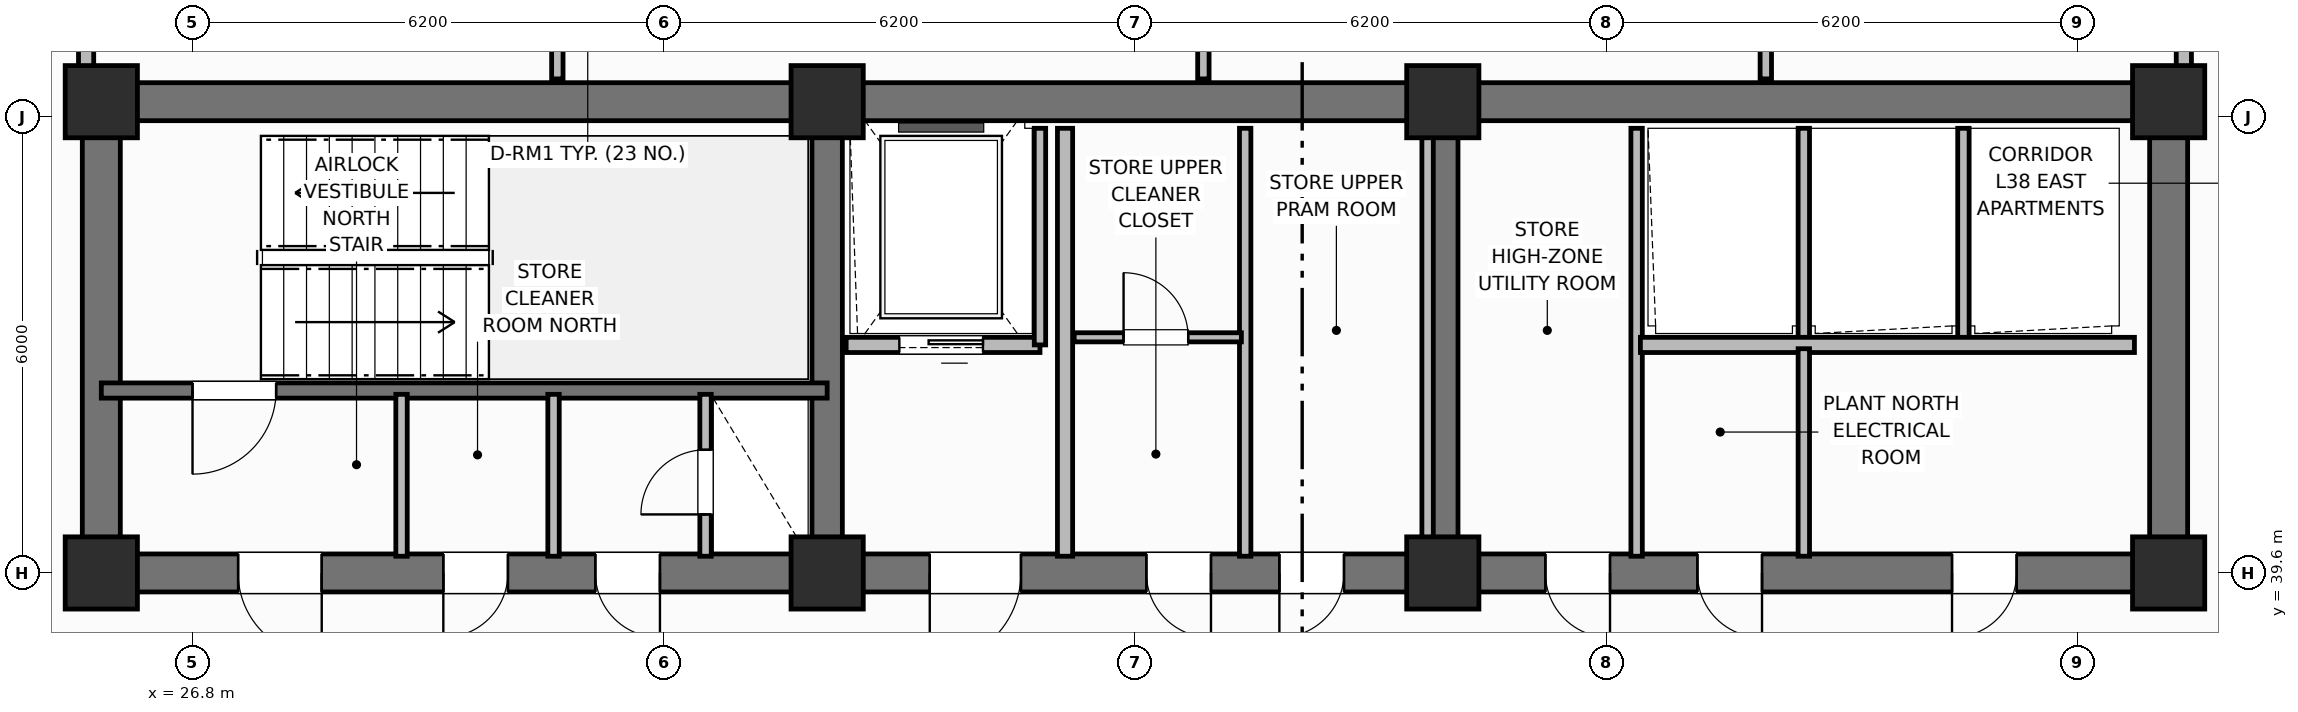
"""IFC4 building model, lengths in metres.
Left out: names, types, materials, properties, quantities, classifications, styles, units other than length and angle.
Written with IfcOpenShell. Run it as: python <this file> out.ifc"""

import sys

from ifc_helpers import new_model, si_unit, direction, frame, frame_2d, origin, origin_2d, place, context, subcontext, project, spatial, rectangle, extrude, element, fill, save


model = new_model("IFC4")
c1 = context("Model", 3, precision=1e-05, world=origin(), true_north=direction((0.0, 1.0)))
c2 = subcontext(c1, "Body", "Model", "MODEL_VIEW")
j1 = project(units=[si_unit("LENGTHUNIT", "METRE"), si_unit("PLANEANGLEUNIT", "RADIAN")], contexts=[c1])
p1 = place(None, origin())
s1 = spatial("IfcSite", under=j1, at=p1, CompositionType="ELEMENT")
p2 = place(p1, origin())
s2 = spatial("IfcBuilding", under=s1, at=p2, CompositionType="ELEMENT")
p3 = place(p2, frame((0.0, 0.0, 155.2)))
s3 = spatial("IfcBuildingStorey", under=s2, at=p3, CompositionType="ELEMENT", Elevation=155.2)
p4 = place(p3, frame((25.6, 45.8, 0.0), z_axis=(0.0, 0.0, 1.0), x_axis=(1.0, 0.0, 0.0)))
e1 = element("IfcWall", 1, at=p4, inside=s3, PredefinedType="SHEAR", context=c2, shape_type="SweptSolid", body=[
    extrude(rectangle(XDim=27.2, YDim=0.5, at=frame_2d((13.6, 0.0))), origin(), (0.0, 0.0, 1.0), 3.7),
])
for number, where, z_axis, x_axis in (
    (2, (25.6, 39.85, 0.0), (0.0, 0.0, 1.0), (0.0, 1.0, 0.0)),
    (3, (52.8, 39.85, 0.0), (0.0, 0.0, 1.0), (0.0, 1.0, 0.0)),
):
    element("IfcWall", number, at=place(p3, frame(where, z_axis=z_axis, x_axis=x_axis)), inside=s3, PredefinedType="SHEAR", context=c2, shape_type="SweptSolid", body=[
        extrude(rectangle(XDim=5.7, YDim=0.5, at=frame_2d((2.85, 0.0))), origin(), (0.0, 0.0, 1.0), 3.7),
    ])
p5 = place(p3, frame((52.8, 39.6, 0.0), z_axis=(0.0, 0.0, 1.0), x_axis=(-1.0, 0.0, 0.0)))
e4 = element("IfcWall", 4, at=p5, inside=s3, PredefinedType="SHEAR", context=c2, shape_type="SweptSolid", body=[
    extrude(rectangle(XDim=27.2, YDim=0.5, at=frame_2d((13.6, 0.0))), origin(), (0.0, 0.0, 1.0), 3.7),
])
p6 = place(p5, frame((24.3, 0.0, 0.0)))
e5 = element("IfcOpeningElement", 5, at=p6, cuts=e4, PredefinedType="OPENING", context=c2, shape_type="SweptSolid", body=[
    extrude(rectangle(XDim=1.1, YDim=2.15, at=frame_2d((0.55, 1.075))), frame((0.0, 0.26, 0.0), z_axis=(0.0, -1.0, 0.0), x_axis=(1.0, 0.0, 0.0)), (0.0, 0.0, 1.0), 0.52),
])
p7 = place(p5, frame((21.85, 0.0, 0.0)))
e6 = element("IfcOpeningElement", 6, at=p7, cuts=e4, PredefinedType="OPENING", context=c2, shape_type="SweptSolid", body=[
    extrude(rectangle(XDim=0.85, YDim=2.1, at=frame_2d((0.425, 1.05))), frame((0.0, 0.26, 0.0), z_axis=(0.0, -1.0, 0.0), x_axis=(1.0, 0.0, 0.0)), (0.0, 0.0, 1.0), 0.52),
])
p8 = place(p5, frame((19.85, 0.0, 0.0)))
e7 = element("IfcOpeningElement", 7, at=p8, cuts=e4, PredefinedType="OPENING", context=c2, shape_type="SweptSolid", body=[
    extrude(rectangle(XDim=0.85, YDim=2.1, at=frame_2d((0.425, 1.05))), frame((0.0, 0.26, 0.0), z_axis=(0.0, -1.0, 0.0), x_axis=(1.0, 0.0, 0.0)), (0.0, 0.0, 1.0), 0.52),
])
p9 = place(p5, frame((15.1, 0.0, 0.0)))
e8 = element("IfcOpeningElement", 8, at=p9, cuts=e4, PredefinedType="OPENING", context=c2, shape_type="SweptSolid", body=[
    extrude(rectangle(XDim=1.2, YDim=2.15, at=frame_2d((0.6, 1.075))), frame((0.0, 0.26, 0.0), z_axis=(0.0, -1.0, 0.0), x_axis=(1.0, 0.0, 0.0)), (0.0, 0.0, 1.0), 0.52),
])
p10 = place(p5, frame((12.6, 0.0, 0.0)))
e9 = element("IfcOpeningElement", 9, at=p10, cuts=e4, PredefinedType="OPENING", context=c2, shape_type="SweptSolid", body=[
    extrude(rectangle(XDim=0.85, YDim=2.1, at=frame_2d((0.425, 1.05))), frame((0.0, 0.26, 0.0), z_axis=(0.0, -1.0, 0.0), x_axis=(1.0, 0.0, 0.0)), (0.0, 0.0, 1.0), 0.52),
])
p11 = place(p5, frame((10.85, 0.0, 0.0)))
e10 = element("IfcOpeningElement", 10, at=p11, cuts=e4, PredefinedType="OPENING", context=c2, shape_type="SweptSolid", body=[
    extrude(rectangle(XDim=0.85, YDim=2.1, at=frame_2d((0.425, 1.05))), frame((0.0, 0.26, 0.0), z_axis=(0.0, -1.0, 0.0), x_axis=(1.0, 0.0, 0.0)), (0.0, 0.0, 1.0), 0.52),
])
p12 = place(p5, frame((7.35, 0.0, 0.0)))
e11 = element("IfcOpeningElement", 11, at=p12, cuts=e4, PredefinedType="OPENING", context=c2, shape_type="SweptSolid", body=[
    extrude(rectangle(XDim=0.85, YDim=2.1, at=frame_2d((0.425, 1.05))), frame((0.0, 0.26, 0.0), z_axis=(0.0, -1.0, 0.0), x_axis=(1.0, 0.0, 0.0)), (0.0, 0.0, 1.0), 0.52),
])
p13 = place(p5, frame((5.35, 0.0, 0.0)))
e12 = element("IfcOpeningElement", 12, at=p13, cuts=e4, PredefinedType="OPENING", context=c2, shape_type="SweptSolid", body=[
    extrude(rectangle(XDim=0.85, YDim=2.1, at=frame_2d((0.425, 1.05))), frame((0.0, 0.26, 0.0), z_axis=(0.0, -1.0, 0.0), x_axis=(1.0, 0.0, 0.0)), (0.0, 0.0, 1.0), 0.52),
])
p14 = place(p5, frame((2.0, 0.0, 0.0)))
e13 = element("IfcOpeningElement", 13, at=p14, cuts=e4, PredefinedType="OPENING", context=c2, shape_type="SweptSolid", body=[
    extrude(rectangle(XDim=0.85, YDim=2.1, at=frame_2d((0.425, 1.05))), frame((0.0, 0.26, 0.0), z_axis=(0.0, -1.0, 0.0), x_axis=(1.0, 0.0, 0.0)), (0.0, 0.0, 1.0), 0.52),
])
for number, where, z_axis, x_axis in (
    (14, (35.15, 39.85, 0.0), (0.0, 0.0, 1.0), (0.0, 1.0, 0.0)),
    (15, (43.25, 39.85, 0.0), (0.0, 0.0, 1.0), (0.0, 1.0, 0.0)),
):
    element("IfcWall", number, at=place(p3, frame(where, z_axis=z_axis, x_axis=x_axis)), inside=s3, PredefinedType="SHEAR", context=c2, shape_type="SweptSolid", body=[
        extrude(rectangle(XDim=5.7, YDim=0.4, at=frame_2d((2.85, 0.0))), origin(), (0.0, 0.0, 1.0), 3.7),
    ])
for number, where, z_axis, x_axis in (
    (16, (25.6, 39.6, 0.0), (0.0, 0.0, 1.0), (1.0, 0.0, 0.0)),
    (17, (25.6, 45.8, 0.0), (0.0, 0.0, 1.0), (1.0, 0.0, 0.0)),
    (18, (35.15, 39.6, 0.0), (0.0, 0.0, 1.0), (1.0, 0.0, 0.0)),
    (19, (35.15, 45.8, 0.0), (0.0, 0.0, 1.0), (1.0, 0.0, 0.0)),
    (20, (43.25, 39.6, 0.0), (0.0, 0.0, 1.0), (1.0, 0.0, 0.0)),
    (21, (43.25, 45.8, 0.0), (0.0, 0.0, 1.0), (1.0, 0.0, 0.0)),
    (22, (52.8, 39.6, 0.0), (0.0, 0.0, 1.0), (1.0, 0.0, 0.0)),
    (23, (52.8, 45.8, 0.0), (0.0, 0.0, 1.0), (1.0, 0.0, 0.0)),
):
    element("IfcColumn", number, at=place(p3, frame(where, z_axis=z_axis, x_axis=x_axis)), inside=s3, PredefinedType="COLUMN", context=c2, shape_type="SweptSolid", body=[
        extrude(rectangle(XDim=0.95, YDim=0.95, at=origin_2d()), origin(), (0.0, 0.0, 1.0), 3.7),
    ])
p15 = place(p3, frame((35.15, 42.0, 0.0), z_axis=(0.0, 0.0, 1.0), x_axis=(-1.0, 0.0, 0.0)))
e24 = element("IfcWall", 24, at=p15, inside=s3, PredefinedType="SHEAR", context=c2, shape_type="SweptSolid", body=[
    extrude(rectangle(XDim=9.55, YDim=0.2, at=frame_2d((4.775, 0.0))), origin(), (0.0, 0.0, 1.0), 3.7),
])
p16 = place(p15, frame((7.25, 0.0, 0.0)))
e25 = element("IfcOpeningElement", 25, at=p16, cuts=e24, PredefinedType="OPENING", context=c2, shape_type="SweptSolid", body=[
    extrude(rectangle(XDim=1.1, YDim=2.15, at=frame_2d((0.55, 1.075))), frame((0.0, 0.11, 0.0), z_axis=(0.0, -1.0, 0.0), x_axis=(1.0, 0.0, 0.0)), (0.0, 0.0, 1.0), 0.22),
])
p17 = place(p3, frame((33.55, 39.82, 0.0), z_axis=(0.0, 0.0, 1.0), x_axis=(0.0, 1.0, 0.0)))
e26 = element("IfcWall", 26, at=p17, inside=s3, PredefinedType="PARTITIONING", context=c2, shape_type="SweptSolid", body=[
    extrude(rectangle(XDim=2.13, YDim=0.15, at=frame_2d((1.065, 0.0))), origin(), (0.0, 0.0, 1.0), 2.55),
])
p18 = place(p17, frame((0.55, 0.0, 0.0)))
e27 = element("IfcOpeningElement", 27, at=p18, cuts=e26, PredefinedType="OPENING", context=c2, shape_type="SweptSolid", body=[
    extrude(rectangle(XDim=0.85, YDim=2.05, at=frame_2d((0.425, 1.025))), frame((0.0, 0.085, 0.0), z_axis=(0.0, -1.0, 0.0), x_axis=(1.0, 0.0, 0.0)), (0.0, 0.0, 1.0), 0.17),
])
for number, where, z_axis, x_axis in (
    (28, (29.55, 39.82, 0.0), (0.0, 0.0, 1.0), (0.0, 1.0, 0.0)),
    (29, (31.55, 39.82, 0.0), (0.0, 0.0, 1.0), (0.0, 1.0, 0.0)),
):
    element("IfcWall", number, at=place(p3, frame(where, z_axis=z_axis, x_axis=x_axis)), inside=s3, PredefinedType="PARTITIONING", context=c2, shape_type="SweptSolid", body=[
        extrude(rectangle(XDim=2.13, YDim=0.15, at=frame_2d((1.065, 0.0))), origin(), (0.0, 0.0, 1.0), 2.55),
    ])
p19 = place(p3, frame((37.95, 42.6, 0.0), z_axis=(0.0, 0.0, 1.0), x_axis=(-1.0, 0.0, 0.0)))
e30 = element("IfcWall", 30, at=p19, inside=s3, PredefinedType="PARTITIONING", context=c2, shape_type="SweptSolid", body=[
    extrude(rectangle(XDim=2.55, YDim=0.2, at=frame_2d((1.275, 0.0))), origin(), (0.0, 0.0, 1.0), 2.32),
])
p20 = place(p19, frame((0.75, 0.0, 0.0)))
e31 = element("IfcOpeningElement", 31, at=p20, cuts=e30, PredefinedType="OPENING", context=c2, shape_type="SweptSolid", body=[
    extrude(rectangle(XDim=1.1, YDim=2.15, at=frame_2d((0.55, 1.075))), frame((0.0, 0.11, 0.0), z_axis=(0.0, -1.0, 0.0), x_axis=(1.0, 0.0, 0.0)), (0.0, 0.0, 1.0), 0.22),
])
p21 = place(p3, frame((37.95, 42.6, 0.0), z_axis=(0.0, 0.0, 1.0), x_axis=(0.0, 1.0, 0.0)))
e32 = element("IfcWall", 32, at=p21, inside=s3, PredefinedType="PARTITIONING", context=c2, shape_type="SweptSolid", body=[
    extrude(rectangle(XDim=2.85, YDim=0.15, at=frame_2d((1.425, 0.0))), origin(), (0.0, 0.0, 1.0), 2.55),
])
p22 = place(p3, frame((38.28, 39.82, 0.0), z_axis=(0.0, 0.0, 1.0), x_axis=(0.0, 1.0, 0.0)))
e33 = element("IfcWall", 33, at=p22, inside=s3, PredefinedType="PARTITIONING", context=c2, shape_type="SweptSolid", body=[
    extrude(rectangle(XDim=5.63, YDim=0.2, at=frame_2d((2.815, 0.0))), origin(), (0.0, 0.0, 1.0), 2.55),
])
for number, where, z_axis, x_axis in (
    (34, (43.05, 39.82, 0.0), (0.0, 0.0, 1.0), (0.0, 1.0, 0.0)),
    (35, (40.65, 39.82, 0.0), (0.0, 0.0, 1.0), (0.0, 1.0, 0.0)),
):
    element("IfcWall", number, at=place(p3, frame(where, z_axis=z_axis, x_axis=x_axis)), inside=s3, PredefinedType="PARTITIONING", context=c2, shape_type="SweptSolid", body=[
        extrude(rectangle(XDim=5.63, YDim=0.15, at=frame_2d((2.815, 0.0))), origin(), (0.0, 0.0, 1.0), 2.55),
    ])
p23 = place(p3, frame((38.4, 42.7, 0.0), z_axis=(0.0, 0.0, 1.0), x_axis=(1.0, 0.0, 0.0)))
e36 = element("IfcWall", 36, at=p23, inside=s3, PredefinedType="PARTITIONING", context=c2, shape_type="SweptSolid", body=[
    extrude(rectangle(XDim=2.2, YDim=0.12, at=frame_2d((1.1, 0.0))), origin(), (0.0, 0.0, 1.0), 2.32),
])
p24 = place(p23, frame((0.65, 0.0, 0.0)))
e37 = element("IfcOpeningElement", 37, at=p24, cuts=e36, PredefinedType="OPENING", context=c2, shape_type="SweptSolid", body=[
    extrude(rectangle(XDim=0.85, YDim=2.1, at=frame_2d((0.425, 1.05))), frame((0.0, 0.07, 0.0), z_axis=(0.0, -1.0, 0.0), x_axis=(1.0, 0.0, 0.0)), (0.0, 0.0, 1.0), 0.14),
])
p25 = place(p3, frame((45.8, 39.82, 0.0), z_axis=(0.0, 0.0, 1.0), x_axis=(0.0, 1.0, 0.0)))
e38 = element("IfcWall", 38, at=p25, inside=s3, PredefinedType="PARTITIONING", context=c2, shape_type="SweptSolid", body=[
    extrude(rectangle(XDim=5.63, YDim=0.15, at=frame_2d((2.815, 0.0))), origin(), (0.0, 0.0, 1.0), 2.55),
])
for number, where, z_axis, x_axis in (
    (39, (48.0, 42.65, 0.0), (0.0, 0.0, 1.0), (0.0, 1.0, 0.0)),
    (40, (50.1, 42.65, 0.0), (0.0, 0.0, 1.0), (0.0, 1.0, 0.0)),
):
    element("IfcWall", number, at=place(p3, frame(where, z_axis=z_axis, x_axis=x_axis)), inside=s3, PredefinedType="PARTITIONING", context=c2, shape_type="SweptSolid", body=[
        extrude(rectangle(XDim=2.8, YDim=0.15, at=frame_2d((1.4, 0.0))), origin(), (0.0, 0.0, 1.0), 2.55),
    ])
p26 = place(p3, frame((52.35, 42.6, 0.0), z_axis=(0.0, 0.0, 1.0), x_axis=(-1.0, 0.0, 0.0)))
e41 = element("IfcWall", 41, at=p26, inside=s3, PredefinedType="PARTITIONING", context=c2, shape_type="SweptSolid", body=[
    extrude(rectangle(XDim=6.5, YDim=0.2, at=frame_2d((3.25, 0.0))), origin(), (0.0, 0.0, 1.0), 2.55),
])
p27 = place(p3, frame((48.0, 39.82, 0.0), z_axis=(0.0, 0.0, 1.0), x_axis=(0.0, 1.0, 0.0)))
e42 = element("IfcWall", 42, at=p27, inside=s3, PredefinedType="PARTITIONING", context=c2, shape_type="SweptSolid", body=[
    extrude(rectangle(XDim=2.73, YDim=0.15, at=frame_2d((1.365, 0.0))), origin(), (0.0, 0.0, 1.0), 2.55),
])
p28 = place(p3, frame((31.6, 46.1, 0.0), z_axis=(0.0, 0.0, 1.0), x_axis=(0.0, 1.0, 0.0)))
e43 = element("IfcWall", 43, at=p28, inside=s3, PredefinedType="PARTITIONING", context=c2, shape_type="SweptSolid", body=[
    extrude(rectangle(XDim=3.43, YDim=0.15, at=frame_2d((1.715, 0.0))), origin(), (0.0, 0.0, 1.0), 2.55),
])
p29 = place(p28, frame((0.85, 0.0, 0.0)))
e44 = element("IfcOpeningElement", 44, at=p29, cuts=e43, PredefinedType="OPENING", context=c2, shape_type="SweptSolid", body=[
    extrude(rectangle(XDim=0.9, YDim=2.1, at=frame_2d((0.45, 1.05))), frame((0.0, 0.085, 0.0), z_axis=(0.0, -1.0, 0.0), x_axis=(1.0, 0.0, 0.0)), (0.0, 0.0, 1.0), 0.17),
])
p30 = place(p3, frame((40.1, 46.1, 0.0), z_axis=(0.0, 0.0, 1.0), x_axis=(0.0, 1.0, 0.0)))
e45 = element("IfcWall", 45, at=p30, inside=s3, PredefinedType="PARTITIONING", context=c2, shape_type="SweptSolid", body=[
    extrude(rectangle(XDim=3.43, YDim=0.15, at=frame_2d((1.715, 0.0))), origin(), (0.0, 0.0, 1.0), 2.55),
])
p31 = place(p3, frame((47.5, 46.1, 0.0), z_axis=(0.0, 0.0, 1.0), x_axis=(0.0, 1.0, 0.0)))
e46 = element("IfcWall", 46, at=p31, inside=s3, PredefinedType="PARTITIONING", context=c2, shape_type="SweptSolid", body=[
    extrude(rectangle(XDim=3.43, YDim=0.15, at=frame_2d((1.715, 0.0))), origin(), (0.0, 0.0, 1.0), 2.55),
])
p32 = place(p31, frame((0.85, 0.0, 0.0)))
e47 = element("IfcOpeningElement", 47, at=p32, cuts=e46, PredefinedType="OPENING", context=c2, shape_type="SweptSolid", body=[
    extrude(rectangle(XDim=0.9, YDim=2.1, at=frame_2d((0.45, 1.05))), frame((0.0, 0.085, 0.0), z_axis=(0.0, -1.0, 0.0), x_axis=(1.0, 0.0, 0.0)), (0.0, 0.0, 1.0), 0.17),
])
p33 = place(p3, frame((25.4, 46.1, 0.0), z_axis=(0.0, 0.0, 1.0), x_axis=(0.0, 1.0, 0.0)))
e48 = element("IfcWall", 48, at=p33, inside=s3, PredefinedType="PARTITIONING", context=c2, shape_type="SweptSolid", body=[
    extrude(rectangle(XDim=2.48, YDim=0.2, at=frame_2d((1.24, 0.0))), origin(), (0.0, 0.0, 1.0), 2.55),
])
p34 = place(p33, frame((0.65, 0.0, 0.0)))
e49 = element("IfcOpeningElement", 49, at=p34, cuts=e48, PredefinedType="OPENING", context=c2, shape_type="SweptSolid", body=[
    extrude(rectangle(XDim=0.9, YDim=2.1, at=frame_2d((0.45, 1.05))), frame((0.0, 0.11, 0.0), z_axis=(0.0, -1.0, 0.0), x_axis=(1.0, 0.0, 0.0)), (0.0, 0.0, 1.0), 0.22),
])
p35 = place(p3, frame((53.0, 46.1, 0.0), z_axis=(0.0, 0.0, 1.0), x_axis=(0.0, 1.0, 0.0)))
e50 = element("IfcWall", 50, at=p35, inside=s3, PredefinedType="PARTITIONING", context=c2, shape_type="SweptSolid", body=[
    extrude(rectangle(XDim=2.48, YDim=0.2, at=frame_2d((1.24, 0.0))), origin(), (0.0, 0.0, 1.0), 2.55),
])
p36 = place(p35, frame((0.65, 0.0, 0.0)))
e51 = element("IfcOpeningElement", 51, at=p36, cuts=e50, PredefinedType="OPENING", context=c2, shape_type="SweptSolid", body=[
    extrude(rectangle(XDim=0.9, YDim=2.1, at=frame_2d((0.45, 1.05))), frame((0.0, 0.11, 0.0), z_axis=(0.0, -1.0, 0.0), x_axis=(1.0, 0.0, 0.0)), (0.0, 0.0, 1.0), 0.22),
])
p37 = place(p16, origin())
e52 = element("IfcDoor", 52, at=p37, inside=s3, OperationType="SINGLE_SWING_RIGHT", PredefinedType="DOOR", context=c2, shape_type="SweptSolid", body=[
    extrude(rectangle(XDim=1.1, YDim=2.15, at=frame_2d((0.55, 1.075))), frame((0.0, 0.025, 0.0), z_axis=(0.0, -1.0, 0.0), x_axis=(1.0, 0.0, 0.0)), (0.0, 0.0, 1.0), 0.05),
])
fill(e25, e52)
p38 = place(p18, origin())
e53 = element("IfcDoor", 53, at=p38, inside=s3, OperationType="SINGLE_SWING_LEFT", PredefinedType="TRAPDOOR", context=c2, shape_type="SweptSolid", body=[
    extrude(rectangle(XDim=0.85, YDim=2.05, at=frame_2d((0.425, 1.025))), frame((0.0, 0.025, 0.0), z_axis=(0.0, -1.0, 0.0), x_axis=(1.0, 0.0, 0.0)), (0.0, 0.0, 1.0), 0.05),
])
fill(e27, e53)
p39 = place(p20, origin())
e54 = element("IfcDoor", 54, at=p39, inside=s3, OperationType="SLIDING_TO_LEFT", PredefinedType="DOOR", context=c2, shape_type="SweptSolid", body=[
    extrude(rectangle(XDim=1.1, YDim=2.15, at=frame_2d((0.55, 1.075))), frame((0.0, 0.025, 0.0), z_axis=(0.0, -1.0, 0.0), x_axis=(1.0, 0.0, 0.0)), (0.0, 0.0, 1.0), 0.05),
])
fill(e31, e54)
p40 = place(p24, origin())
e55 = element("IfcDoor", 55, at=p40, inside=s3, OperationType="SINGLE_SWING_LEFT", PredefinedType="DOOR", context=c2, shape_type="SweptSolid", body=[
    extrude(rectangle(XDim=0.85, YDim=2.1, at=frame_2d((0.425, 1.05))), frame((0.0, 0.025, 0.0), z_axis=(0.0, -1.0, 0.0), x_axis=(1.0, 0.0, 0.0)), (0.0, 0.0, 1.0), 0.05),
])
fill(e37, e55)
p41 = place(p6, origin())
e56 = element("IfcDoor", 56, at=p41, inside=s3, OperationType="SINGLE_SWING_LEFT", PredefinedType="DOOR", context=c2, shape_type="SweptSolid", body=[
    extrude(rectangle(XDim=1.1, YDim=2.15, at=frame_2d((0.55, 1.075))), frame((0.0, 0.025, 0.0), z_axis=(0.0, -1.0, 0.0), x_axis=(1.0, 0.0, 0.0)), (0.0, 0.0, 1.0), 0.05),
])
fill(e5, e56)
p42 = place(p7, origin())
e57 = element("IfcDoor", 57, at=p42, inside=s3, OperationType="SINGLE_SWING_RIGHT", PredefinedType="DOOR", context=c2, shape_type="SweptSolid", body=[
    extrude(rectangle(XDim=0.85, YDim=2.1, at=frame_2d((0.425, 1.05))), frame((0.0, 0.025, 0.0), z_axis=(0.0, -1.0, 0.0), x_axis=(1.0, 0.0, 0.0)), (0.0, 0.0, 1.0), 0.05),
])
fill(e6, e57)
p43 = place(p8, origin())
e58 = element("IfcDoor", 58, at=p43, inside=s3, OperationType="SINGLE_SWING_LEFT", PredefinedType="DOOR", context=c2, shape_type="SweptSolid", body=[
    extrude(rectangle(XDim=0.85, YDim=2.1, at=frame_2d((0.425, 1.05))), frame((0.0, 0.025, 0.0), z_axis=(0.0, -1.0, 0.0), x_axis=(1.0, 0.0, 0.0)), (0.0, 0.0, 1.0), 0.05),
])
fill(e7, e58)
p44 = place(p9, origin())
e59 = element("IfcDoor", 59, at=p44, inside=s3, OperationType="SINGLE_SWING_RIGHT", PredefinedType="DOOR", context=c2, shape_type="SweptSolid", body=[
    extrude(rectangle(XDim=1.2, YDim=2.15, at=frame_2d((0.6, 1.075))), frame((0.0, 0.025, 0.0), z_axis=(0.0, -1.0, 0.0), x_axis=(1.0, 0.0, 0.0)), (0.0, 0.0, 1.0), 0.05),
])
fill(e8, e59)
p45 = place(p10, origin())
e60 = element("IfcDoor", 60, at=p45, inside=s3, OperationType="SINGLE_SWING_LEFT", PredefinedType="DOOR", context=c2, shape_type="SweptSolid", body=[
    extrude(rectangle(XDim=0.85, YDim=2.1, at=frame_2d((0.425, 1.05))), frame((0.0, 0.025, 0.0), z_axis=(0.0, -1.0, 0.0), x_axis=(1.0, 0.0, 0.0)), (0.0, 0.0, 1.0), 0.05),
])
fill(e9, e60)
p46 = place(p11, origin())
e61 = element("IfcDoor", 61, at=p46, inside=s3, OperationType="SINGLE_SWING_RIGHT", PredefinedType="DOOR", context=c2, shape_type="SweptSolid", body=[
    extrude(rectangle(XDim=0.85, YDim=2.1, at=frame_2d((0.425, 1.05))), frame((0.0, 0.025, 0.0), z_axis=(0.0, -1.0, 0.0), x_axis=(1.0, 0.0, 0.0)), (0.0, 0.0, 1.0), 0.05),
])
fill(e10, e61)
p47 = place(p12, origin())
e62 = element("IfcDoor", 62, at=p47, inside=s3, OperationType="SINGLE_SWING_LEFT", PredefinedType="DOOR", context=c2, shape_type="SweptSolid", body=[
    extrude(rectangle(XDim=0.85, YDim=2.1, at=frame_2d((0.425, 1.05))), frame((0.0, 0.025, 0.0), z_axis=(0.0, -1.0, 0.0), x_axis=(1.0, 0.0, 0.0)), (0.0, 0.0, 1.0), 0.05),
])
fill(e11, e62)
p48 = place(p13, origin())
e63 = element("IfcDoor", 63, at=p48, inside=s3, OperationType="SINGLE_SWING_LEFT", PredefinedType="DOOR", context=c2, shape_type="SweptSolid", body=[
    extrude(rectangle(XDim=0.85, YDim=2.1, at=frame_2d((0.425, 1.05))), frame((0.0, 0.025, 0.0), z_axis=(0.0, -1.0, 0.0), x_axis=(1.0, 0.0, 0.0)), (0.0, 0.0, 1.0), 0.05),
])
fill(e12, e63)
p49 = place(p14, origin())
e64 = element("IfcDoor", 64, at=p49, inside=s3, OperationType="SINGLE_SWING_RIGHT", PredefinedType="DOOR", context=c2, shape_type="SweptSolid", body=[
    extrude(rectangle(XDim=0.85, YDim=2.1, at=frame_2d((0.425, 1.05))), frame((0.0, 0.025, 0.0), z_axis=(0.0, -1.0, 0.0), x_axis=(1.0, 0.0, 0.0)), (0.0, 0.0, 1.0), 0.05),
])
fill(e13, e64)
save(model, sys.argv[1])
